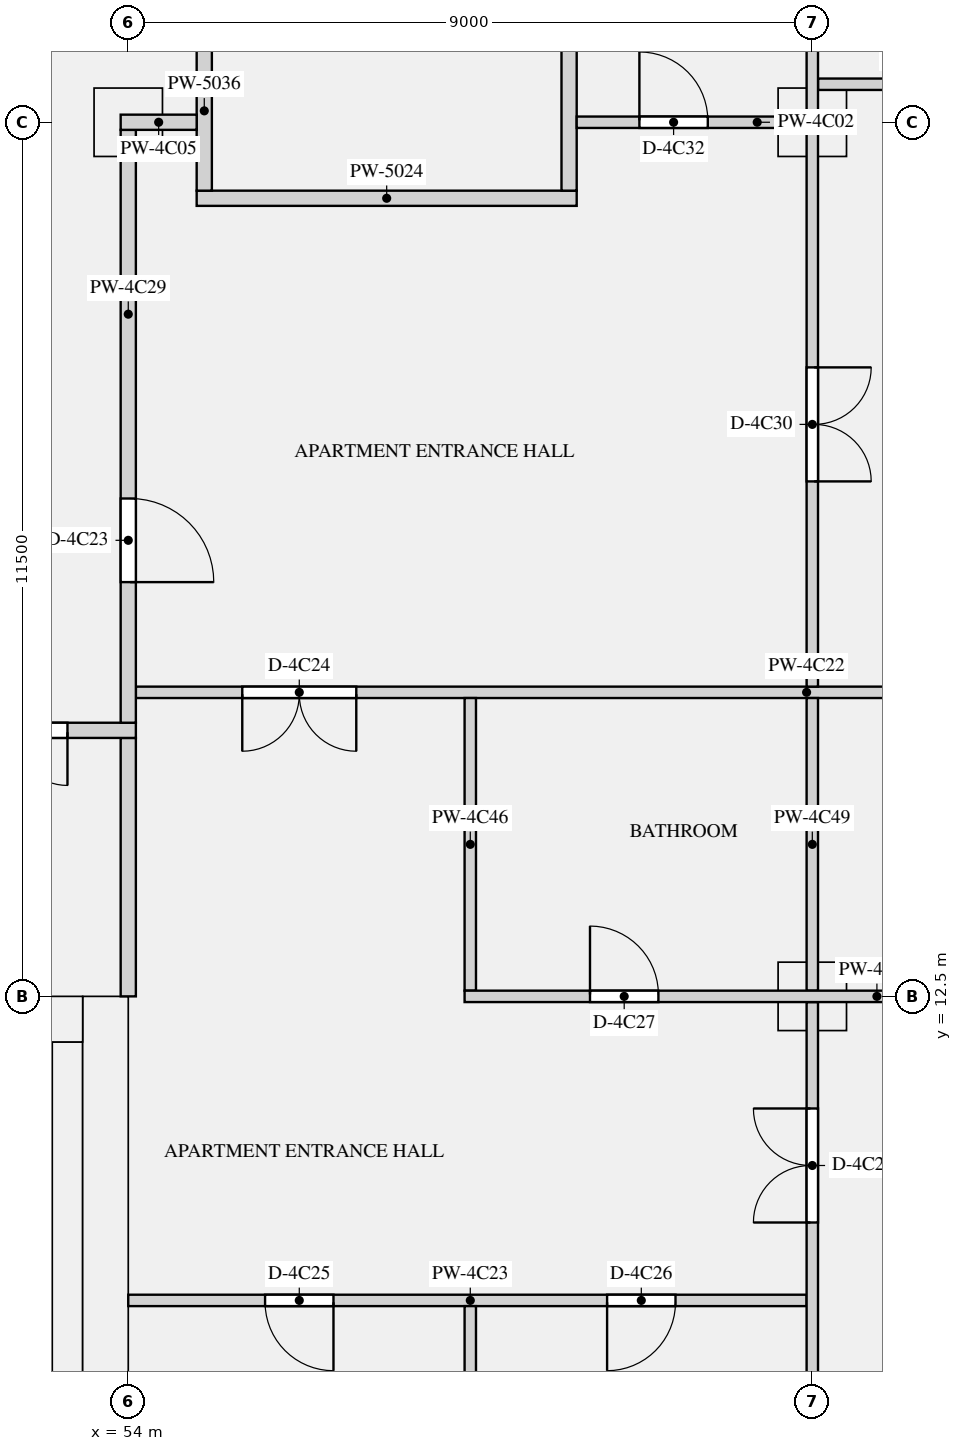
"""IFC4 building model, lengths in metres.
Left out: names, types, materials, properties, quantities, classifications, styles, units other than length and angle.
Written with IfcOpenShell. Run it as: python <this file> out.ifc"""

import sys

from ifc_helpers import new_model, si_unit, direction, frame, frame_2d, origin, origin_2d, place, context, subcontext, project, spatial, rectangle, extrude, element, fill, save


model = new_model("IFC4")
c1 = context("Model", 3, precision=1e-05, world=origin(), true_north=direction((0.0, 1.0)))
c2 = subcontext(c1, "Body", "Model", "MODEL_VIEW")
j1 = project(units=[si_unit("LENGTHUNIT", "METRE"), si_unit("PLANEANGLEUNIT", "RADIAN")], contexts=[c1])
p1 = place(None, origin())
s1 = spatial("IfcSite", under=j1, at=p1, CompositionType="ELEMENT")
p2 = place(p1, origin())
s2 = spatial("IfcBuilding", under=s1, at=p2, CompositionType="ELEMENT")
p3 = place(p2, frame((0.0, 0.0, 216.9)))
s3 = spatial("IfcBuildingStorey", under=s2, at=p3, CompositionType="ELEMENT", Elevation=216.9)
for number, where, z_axis, x_axis in (
    (1, (54.0, 24.0, 0.0), (0.0, 0.0, 1.0), (1.0, 0.0, 0.0)),
    (2, (63.0, 24.0, 0.0), (0.0, 0.0, 1.0), (1.0, 0.0, 0.0)),
    (3, (63.0, 12.5, 0.0), (0.0, 0.0, 1.0), (1.0, 0.0, 0.0)),
):
    element("IfcColumn", number, at=place(p3, frame(where, z_axis=z_axis, x_axis=x_axis)), inside=s3, PredefinedType="COLUMN", context=c2, shape_type="SweptSolid", body=[
        extrude(rectangle(XDim=0.9, YDim=0.9, at=origin_2d()), origin(), (0.0, 0.0, 1.0), 3.15),
    ])
p4 = place(p3, frame((53.7, 0.0, 0.0), z_axis=(0.0, 0.0, 1.0), x_axis=(0.0, 1.0, 0.0)))
e4 = element("IfcWall", 4, at=p4, inside=s3, PredefinedType="SHEAR", context=c2, shape_type="SweptSolid", body=[
    extrude(rectangle(XDim=12.5, YDim=0.6, at=frame_2d((6.25, 0.0))), origin(), (0.0, 0.0, 1.0), 3.15),
])
p5 = place(p3, frame((18.6, 12.2, 0.0), z_axis=(0.0, 0.0, 1.0), x_axis=(1.0, 0.0, 0.0)))
e5 = element("IfcWall", 5, at=p5, inside=s3, PredefinedType="SHEAR", context=c2, shape_type="SweptSolid", body=[
    extrude(rectangle(XDim=34.8, YDim=0.6, at=frame_2d((17.4, 0.0))), origin(), (0.0, 0.0, 1.0), 3.15),
])
p6 = place(p5, frame((24.575, 0.0, 0.0)))
e6 = element("IfcOpeningElement", 6, at=p6, cuts=e5, PredefinedType="OPENING", context=c2, shape_type="SweptSolid", body=[
    extrude(rectangle(XDim=1.1, YDim=2.1, at=frame_2d((0.55, 1.05))), frame((0.0, 0.31, 0.0), z_axis=(0.0, -1.0, 0.0), x_axis=(1.0, 0.0, 0.0)), (0.0, 0.0, 1.0), 0.62),
])
p7 = place(p5, frame((26.825, 0.0, 0.0)))
e7 = element("IfcOpeningElement", 7, at=p7, cuts=e5, PredefinedType="OPENING", context=c2, shape_type="SweptSolid", body=[
    extrude(rectangle(XDim=1.1, YDim=2.1, at=frame_2d((0.55, 1.05))), frame((0.0, 0.31, 0.0), z_axis=(0.0, -1.0, 0.0), x_axis=(1.0, 0.0, 0.0)), (0.0, 0.0, 1.0), 0.62),
])
p8 = place(p5, frame((29.075, 0.0, 0.0)))
e8 = element("IfcOpeningElement", 8, at=p8, cuts=e5, PredefinedType="OPENING", context=c2, shape_type="SweptSolid", body=[
    extrude(rectangle(XDim=1.1, YDim=2.1, at=frame_2d((0.55, 1.05))), frame((0.0, 0.31, 0.0), z_axis=(0.0, -1.0, 0.0), x_axis=(1.0, 0.0, 0.0)), (0.0, 0.0, 1.0), 0.62),
])
p9 = place(p5, frame((8.95, 0.0, 0.0)))
e9 = element("IfcOpeningElement", 9, at=p9, cuts=e5, PredefinedType="OPENING", context=c2, shape_type="SweptSolid", body=[
    extrude(rectangle(XDim=0.9, YDim=2.1, at=frame_2d((0.45, 1.05))), frame((0.0, 0.31, 0.0), z_axis=(0.0, -1.0, 0.0), x_axis=(1.0, 0.0, 0.0)), (0.0, 0.0, 1.0), 0.62),
])
p10 = place(p5, frame((1.55, 0.0, 0.0)))
e10 = element("IfcOpeningElement", 10, at=p10, cuts=e5, PredefinedType="OPENING", context=c2, shape_type="SweptSolid", body=[
    extrude(rectangle(XDim=1.2, YDim=2.1, at=frame_2d((0.6, 1.05))), frame((0.0, 0.31, 0.0), z_axis=(0.0, -1.0, 0.0), x_axis=(1.0, 0.0, 0.0)), (0.0, 0.0, 1.0), 0.62),
])
p11 = place(p5, frame((32.05, 0.0, 0.0)))
e11 = element("IfcOpeningElement", 11, at=p11, cuts=e5, PredefinedType="OPENING", context=c2, shape_type="SweptSolid", body=[
    extrude(rectangle(XDim=1.2, YDim=2.1, at=frame_2d((0.6, 1.05))), frame((0.0, 0.31, 0.0), z_axis=(0.0, -1.0, 0.0), x_axis=(1.0, 0.0, 0.0)), (0.0, 0.0, 1.0), 0.62),
])
p12 = place(p3, frame((53.2, 1.0, 0.0), z_axis=(0.0, 0.0, 1.0), x_axis=(0.0, 1.0, 0.0)))
e12 = element("IfcWall", 12, at=p12, inside=s3, PredefinedType="SHEAR", context=c2, shape_type="SweptSolid", body=[
    extrude(rectangle(XDim=10.9, YDim=0.4, at=frame_2d((5.45, 0.0))), origin(), (0.0, 0.0, 1.0), 3.15),
])
p13 = place(p3, frame((54.9, 23.0, 0.0), z_axis=(0.0, 0.0, 1.0), x_axis=(1.0, 0.0, 0.0)))
e13 = element("IfcWall", 13, at=p13, inside=s3, PredefinedType="PARTITIONING", context=c2, shape_type="SweptSolid", body=[
    extrude(rectangle(XDim=5.0, YDim=0.2, at=frame_2d((2.5, 0.0))), origin(), (0.0, 0.0, 1.0), 2.83),
])
p14 = place(p3, frame((54.0, 12.5, 0.0), z_axis=(0.0, 0.0, 1.0), x_axis=(0.0, 1.0, 0.0)))
e14 = element("IfcWall", 14, at=p14, inside=s3, PredefinedType="PARTITIONING", context=c2, shape_type="SweptSolid", body=[
    extrude(rectangle(XDim=3.4, YDim=0.2, at=frame_2d((1.7, 0.0))), origin(), (0.0, 0.0, 1.0), 2.83),
])
p15 = place(p3, frame((55.0, 23.1, 0.0), z_axis=(0.0, 0.0, 1.0), x_axis=(0.0, 1.0, 0.0)))
e15 = element("IfcWall", 15, at=p15, inside=s3, PredefinedType="PARTITIONING", context=c2, shape_type="SweptSolid", body=[
    extrude(rectangle(XDim=3.8, YDim=0.2, at=frame_2d((1.9, 0.0))), origin(), (0.0, 0.0, 1.0), 2.83),
])
p16 = place(p15, frame((2.1, 0.0, 0.0)))
e16 = element("IfcOpeningElement", 16, at=p16, cuts=e15, PredefinedType="OPENING", context=c2, shape_type="SweptSolid", body=[
    extrude(rectangle(XDim=1.2, YDim=2.1, at=frame_2d((0.6, 1.05))), frame((0.0, 0.11, 0.0), z_axis=(0.0, -1.0, 0.0), x_axis=(1.0, 0.0, 0.0)), (0.0, 0.0, 1.0), 0.22),
])
p17 = place(p3, frame((59.8, 23.1, 0.0), z_axis=(0.0, 0.0, 1.0), x_axis=(0.0, 1.0, 0.0)))
e17 = element("IfcWall", 17, at=p17, inside=s3, PredefinedType="PARTITIONING", context=c2, shape_type="SweptSolid", body=[
    extrude(rectangle(XDim=3.9, YDim=0.2, at=frame_2d((1.95, 0.0))), origin(), (0.0, 0.0, 1.0), 2.83),
])
p18 = place(p3, frame((59.9, 24.0, 0.0), z_axis=(0.0, 0.0, 1.0), x_axis=(1.0, 0.0, 0.0)))
e18 = element("IfcWall", 18, at=p18, inside=s3, PredefinedType="PARTITIONING", context=c2, shape_type="SweptSolid", body=[
    extrude(rectangle(XDim=3.025, YDim=0.15, at=frame_2d((1.513, 0.0))), origin(), (0.0, 0.0, 1.0), 2.83),
])
p19 = place(p18, frame((0.825, 0.0, 0.0)))
e19 = element("IfcOpeningElement", 19, at=p19, cuts=e18, PredefinedType="OPENING", context=c2, shape_type="SweptSolid", body=[
    extrude(rectangle(XDim=0.9, YDim=2.1, at=frame_2d((0.45, 1.05))), frame((0.0, 0.085, 0.0), z_axis=(0.0, -1.0, 0.0), x_axis=(1.0, 0.0, 0.0)), (0.0, 0.0, 1.0), 0.17),
])
p20 = place(p3, frame((53.9, 24.0, 0.0), z_axis=(0.0, 0.0, 1.0), x_axis=(1.0, 0.0, 0.0)))
e20 = element("IfcWall", 20, at=p20, inside=s3, PredefinedType="PARTITIONING", context=c2, shape_type="SweptSolid", body=[
    extrude(rectangle(XDim=1.0, YDim=0.2, at=frame_2d((0.5, 0.0))), origin(), (0.0, 0.0, 1.0), 2.83),
])
p21 = place(p3, frame((58.425, 12.5, 0.0), z_axis=(0.0, 0.0, 1.0), x_axis=(1.0, 0.0, 0.0)))
e21 = element("IfcWall", 21, at=p21, inside=s3, PredefinedType="PARTITIONING", context=c2, shape_type="SweptSolid", body=[
    extrude(rectangle(XDim=12.925, YDim=0.15, at=frame_2d((6.462, 0.0))), origin(), (0.0, 0.0, 1.0), 2.83),
])
p22 = place(p21, frame((1.65, 0.0, 0.0)))
e22 = element("IfcOpeningElement", 22, at=p22, cuts=e21, PredefinedType="OPENING", context=c2, shape_type="SweptSolid", body=[
    extrude(rectangle(XDim=0.9, YDim=2.1, at=frame_2d((0.45, 1.05))), frame((0.0, 0.085, 0.0), z_axis=(0.0, -1.0, 0.0), x_axis=(1.0, 0.0, 0.0)), (0.0, 0.0, 1.0), 0.17),
])
p23 = place(p21, frame((8.3, 0.0, 0.0)))
e23 = element("IfcOpeningElement", 23, at=p23, cuts=e21, PredefinedType="OPENING", context=c2, shape_type="SweptSolid", body=[
    extrude(rectangle(XDim=1.5, YDim=2.1, at=frame_2d((0.75, 1.05))), frame((0.0, 0.085, 0.0), z_axis=(0.0, -1.0, 0.0), x_axis=(1.0, 0.0, 0.0)), (0.0, 0.0, 1.0), 0.17),
])
p24 = place(p3, frame((54.1, 16.5, 0.0), z_axis=(0.0, 0.0, 1.0), x_axis=(1.0, 0.0, 0.0)))
e24 = element("IfcWall", 24, at=p24, inside=s3, PredefinedType="PARTITIONING", context=c2, shape_type="SweptSolid", body=[
    extrude(rectangle(XDim=14.75, YDim=0.15, at=frame_2d((7.375, 0.0))), origin(), (0.0, 0.0, 1.0), 2.83),
])
p25 = place(p24, frame((1.4, 0.0, 0.0)))
e25 = element("IfcOpeningElement", 25, at=p25, cuts=e24, PredefinedType="OPENING", context=c2, shape_type="SweptSolid", body=[
    extrude(rectangle(XDim=1.5, YDim=2.1, at=frame_2d((0.75, 1.05))), frame((0.0, 0.085, 0.0), z_axis=(0.0, -1.0, 0.0), x_axis=(1.0, 0.0, 0.0)), (0.0, 0.0, 1.0), 0.17),
])
p26 = place(p3, frame((54.0, 8.5, 0.0), z_axis=(0.0, 0.0, 1.0), x_axis=(1.0, 0.0, 0.0)))
e26 = element("IfcWall", 26, at=p26, inside=s3, PredefinedType="PARTITIONING", context=c2, shape_type="SweptSolid", body=[
    extrude(rectangle(XDim=8.925, YDim=0.15, at=frame_2d((4.462, 0.0))), origin(), (0.0, 0.0, 1.0), 2.83),
])
p27 = place(p26, frame((1.8, 0.0, 0.0)))
e27 = element("IfcOpeningElement", 27, at=p27, cuts=e26, PredefinedType="OPENING", context=c2, shape_type="SweptSolid", body=[
    extrude(rectangle(XDim=0.9, YDim=2.1, at=frame_2d((0.45, 1.05))), frame((0.0, 0.085, 0.0), z_axis=(0.0, -1.0, 0.0), x_axis=(1.0, 0.0, 0.0)), (0.0, 0.0, 1.0), 0.17),
])
p28 = place(p26, frame((6.3, 0.0, 0.0)))
e28 = element("IfcOpeningElement", 28, at=p28, cuts=e26, PredefinedType="OPENING", context=c2, shape_type="SweptSolid", body=[
    extrude(rectangle(XDim=0.9, YDim=2.1, at=frame_2d((0.45, 1.05))), frame((0.0, 0.085, 0.0), z_axis=(0.0, -1.0, 0.0), x_axis=(1.0, 0.0, 0.0)), (0.0, 0.0, 1.0), 0.17),
])
p29 = place(p3, frame((63.075, 24.5, 0.0), z_axis=(0.0, 0.0, 1.0), x_axis=(1.0, 0.0, 0.0)))
e29 = element("IfcWall", 29, at=p29, inside=s3, PredefinedType="PARTITIONING", context=c2, shape_type="SweptSolid", body=[
    extrude(rectangle(XDim=5.775, YDim=0.15, at=frame_2d((2.888, 0.0))), origin(), (0.0, 0.0, 1.0), 2.83),
])
p30 = place(p29, frame((2.7, 0.0, 0.0)))
e30 = element("IfcOpeningElement", 30, at=p30, cuts=e29, PredefinedType="OPENING", context=c2, shape_type="SweptSolid", body=[
    extrude(rectangle(XDim=0.9, YDim=2.1, at=frame_2d((0.45, 1.05))), frame((0.0, 0.085, 0.0), z_axis=(0.0, -1.0, 0.0), x_axis=(1.0, 0.0, 0.0)), (0.0, 0.0, 1.0), 0.17),
])
p31 = place(p3, frame((17.925, 16.0, 0.0), z_axis=(0.0, 0.0, 1.0), x_axis=(1.0, 0.0, 0.0)))
e31 = element("IfcWall", 31, at=p31, inside=s3, PredefinedType="PARTITIONING", context=c2, shape_type="SweptSolid", body=[
    extrude(rectangle(XDim=36.175, YDim=0.2, at=frame_2d((18.087, 0.0))), origin(), (0.0, 0.0, 1.0), 2.83),
])
p32 = place(p31, frame((0.875, 0.0, 0.0)))
e32 = element("IfcOpeningElement", 32, at=p32, cuts=e31, PredefinedType="OPENING", context=c2, shape_type="SweptSolid", body=[
    extrude(rectangle(XDim=1.4, YDim=2.1, at=frame_2d((0.7, 1.05))), frame((0.0, 0.11, 0.0), z_axis=(0.0, -1.0, 0.0), x_axis=(1.0, 0.0, 0.0)), (0.0, 0.0, 1.0), 0.22),
])
p33 = place(p31, frame((33.875, 0.0, 0.0)))
e33 = element("IfcOpeningElement", 33, at=p33, cuts=e31, PredefinedType="OPENING", context=c2, shape_type="SweptSolid", body=[
    extrude(rectangle(XDim=1.4, YDim=2.1, at=frame_2d((0.7, 1.05))), frame((0.0, 0.11, 0.0), z_axis=(0.0, -1.0, 0.0), x_axis=(1.0, 0.0, 0.0)), (0.0, 0.0, 1.0), 0.22),
])
p34 = place(p3, frame((54.0, 16.1, 0.0), z_axis=(0.0, 0.0, 1.0), x_axis=(0.0, 1.0, 0.0)))
e34 = element("IfcWall", 34, at=p34, inside=s3, PredefinedType="PARTITIONING", context=c2, shape_type="SweptSolid", body=[
    extrude(rectangle(XDim=7.8, YDim=0.2, at=frame_2d((3.9, 0.0))), origin(), (0.0, 0.0, 1.0), 2.83),
])
p35 = place(p34, frame((1.85, 0.0, 0.0)))
e35 = element("IfcOpeningElement", 35, at=p35, cuts=e34, PredefinedType="OPENING", context=c2, shape_type="SweptSolid", body=[
    extrude(rectangle(XDim=1.1, YDim=2.1, at=frame_2d((0.55, 1.05))), frame((0.0, 0.11, 0.0), z_axis=(0.0, -1.0, 0.0), x_axis=(1.0, 0.0, 0.0)), (0.0, 0.0, 1.0), 0.22),
])
p36 = place(p3, frame((58.5, 0.65, 0.0), z_axis=(0.0, 0.0, 1.0), x_axis=(0.0, 1.0, 0.0)))
e36 = element("IfcWall", 36, at=p36, inside=s3, PredefinedType="PARTITIONING", context=c2, shape_type="SweptSolid", body=[
    extrude(rectangle(XDim=7.775, YDim=0.15, at=frame_2d((3.888, 0.0))), origin(), (0.0, 0.0, 1.0), 2.83),
])
p37 = place(p3, frame((58.5, 12.575, 0.0), z_axis=(0.0, 0.0, 1.0), x_axis=(0.0, 1.0, 0.0)))
e37 = element("IfcWall", 37, at=p37, inside=s3, PredefinedType="PARTITIONING", context=c2, shape_type="SweptSolid", body=[
    extrude(rectangle(XDim=3.85, YDim=0.15, at=frame_2d((1.925, 0.0))), origin(), (0.0, 0.0, 1.0), 2.83),
])
p38 = place(p3, frame((63.0, 0.65, 0.0), z_axis=(0.0, 0.0, 1.0), x_axis=(0.0, 1.0, 0.0)))
e38 = element("IfcWall", 38, at=p38, inside=s3, PredefinedType="PARTITIONING", context=c2, shape_type="SweptSolid", body=[
    extrude(rectangle(XDim=11.775, YDim=0.15, at=frame_2d((5.888, 0.0))), origin(), (0.0, 0.0, 1.0), 2.83),
])
p39 = place(p38, frame((8.875, 0.0, 0.0)))
e39 = element("IfcOpeningElement", 39, at=p39, cuts=e38, PredefinedType="OPENING", context=c2, shape_type="SweptSolid", body=[
    extrude(rectangle(XDim=1.5, YDim=2.1, at=frame_2d((0.75, 1.05))), frame((0.0, 0.085, 0.0), z_axis=(0.0, -1.0, 0.0), x_axis=(1.0, 0.0, 0.0)), (0.0, 0.0, 1.0), 0.17),
])
p40 = place(p3, frame((63.0, 12.575, 0.0), z_axis=(0.0, 0.0, 1.0), x_axis=(0.0, 1.0, 0.0)))
e40 = element("IfcWall", 40, at=p40, inside=s3, PredefinedType="PARTITIONING", context=c2, shape_type="SweptSolid", body=[
    extrude(rectangle(XDim=3.85, YDim=0.15, at=frame_2d((1.925, 0.0))), origin(), (0.0, 0.0, 1.0), 2.83),
])
p41 = place(p3, frame((63.0, 16.575, 0.0), z_axis=(0.0, 0.0, 1.0), x_axis=(0.0, 1.0, 0.0)))
e41 = element("IfcWall", 41, at=p41, inside=s3, PredefinedType="PARTITIONING", context=c2, shape_type="SweptSolid", body=[
    extrude(rectangle(XDim=24.275, YDim=0.15, at=frame_2d((12.138, 0.0))), origin(), (0.0, 0.0, 1.0), 2.83),
])
p42 = place(p41, frame((2.7, 0.0, 0.0)))
e42 = element("IfcOpeningElement", 42, at=p42, cuts=e41, PredefinedType="OPENING", context=c2, shape_type="SweptSolid", body=[
    extrude(rectangle(XDim=1.5, YDim=2.1, at=frame_2d((0.75, 1.05))), frame((0.0, 0.085, 0.0), z_axis=(0.0, -1.0, 0.0), x_axis=(1.0, 0.0, 0.0)), (0.0, 0.0, 1.0), 0.17),
])
p43 = place(p41, frame((13.6, 0.0, 0.0)))
e43 = element("IfcOpeningElement", 43, at=p43, cuts=e41, PredefinedType="OPENING", context=c2, shape_type="SweptSolid", body=[
    extrude(rectangle(XDim=0.9, YDim=2.1, at=frame_2d((0.45, 1.05))), frame((0.0, 0.085, 0.0), z_axis=(0.0, -1.0, 0.0), x_axis=(1.0, 0.0, 0.0)), (0.0, 0.0, 1.0), 0.17),
])
p44 = place(p41, frame((16.875, 0.0, 0.0)))
e44 = element("IfcOpeningElement", 44, at=p44, cuts=e41, PredefinedType="OPENING", context=c2, shape_type="SweptSolid", body=[
    extrude(rectangle(XDim=0.9, YDim=2.1, at=frame_2d((0.45, 1.05))), frame((0.0, 0.085, 0.0), z_axis=(0.0, -1.0, 0.0), x_axis=(1.0, 0.0, 0.0)), (0.0, 0.0, 1.0), 0.17),
])
p45 = place(p33, frame((1.4, 0.0, 0.0), z_axis=(0.0, 0.0, 1.0), x_axis=(-1.0, 0.0, 0.0)))
e45 = element("IfcDoor", 45, at=p45, inside=s3, OperationType="DOUBLE_DOOR_SINGLE_SWING", PredefinedType="DOOR", context=c2, shape_type="SweptSolid", body=[
    extrude(rectangle(XDim=1.4, YDim=2.1, at=frame_2d((0.7, 1.05))), frame((0.0, 0.025, 0.0), z_axis=(0.0, -1.0, 0.0), x_axis=(1.0, 0.0, 0.0)), (0.0, 0.0, 1.0), 0.05),
])
fill(e33, e45)
p46 = place(p35, frame((1.1, 0.0, 0.0), z_axis=(0.0, 0.0, 1.0), x_axis=(-1.0, 0.0, 0.0)))
e46 = element("IfcDoor", 46, at=p46, inside=s3, OperationType="SINGLE_SWING_RIGHT", PredefinedType="DOOR", context=c2, shape_type="SweptSolid", body=[
    extrude(rectangle(XDim=1.1, YDim=2.1, at=frame_2d((0.55, 1.05))), frame((0.0, 0.025, 0.0), z_axis=(0.0, -1.0, 0.0), x_axis=(1.0, 0.0, 0.0)), (0.0, 0.0, 1.0), 0.05),
])
fill(e35, e46)
p47 = place(p25, frame((1.5, 0.0, 0.0), z_axis=(0.0, 0.0, 1.0), x_axis=(-1.0, 0.0, 0.0)))
e47 = element("IfcDoor", 47, at=p47, inside=s3, OperationType="DOUBLE_DOOR_SINGLE_SWING", PredefinedType="DOOR", context=c2, shape_type="SweptSolid", body=[
    extrude(rectangle(XDim=1.5, YDim=2.1, at=frame_2d((0.75, 1.05))), frame((0.0, 0.025, 0.0), z_axis=(0.0, -1.0, 0.0), x_axis=(1.0, 0.0, 0.0)), (0.0, 0.0, 1.0), 0.05),
])
fill(e25, e47)
p48 = place(p27, frame((0.9, 0.0, 0.0), z_axis=(0.0, 0.0, 1.0), x_axis=(-1.0, 0.0, 0.0)))
e48 = element("IfcDoor", 48, at=p48, inside=s3, OperationType="SINGLE_SWING_LEFT", PredefinedType="DOOR", context=c2, shape_type="SweptSolid", body=[
    extrude(rectangle(XDim=0.9, YDim=2.1, at=frame_2d((0.45, 1.05))), frame((0.0, 0.025, 0.0), z_axis=(0.0, -1.0, 0.0), x_axis=(1.0, 0.0, 0.0)), (0.0, 0.0, 1.0), 0.05),
])
fill(e27, e48)
p49 = place(p28, frame((0.9, 0.0, 0.0), z_axis=(0.0, 0.0, 1.0), x_axis=(-1.0, 0.0, 0.0)))
e49 = element("IfcDoor", 49, at=p49, inside=s3, OperationType="SINGLE_SWING_RIGHT", PredefinedType="DOOR", context=c2, shape_type="SweptSolid", body=[
    extrude(rectangle(XDim=0.9, YDim=2.1, at=frame_2d((0.45, 1.05))), frame((0.0, 0.025, 0.0), z_axis=(0.0, -1.0, 0.0), x_axis=(1.0, 0.0, 0.0)), (0.0, 0.0, 1.0), 0.05),
])
fill(e28, e49)
p50 = place(p22, origin())
e50 = element("IfcDoor", 50, at=p50, inside=s3, OperationType="SINGLE_SWING_LEFT", PredefinedType="DOOR", context=c2, shape_type="SweptSolid", body=[
    extrude(rectangle(XDim=0.9, YDim=2.1, at=frame_2d((0.45, 1.05))), frame((0.0, 0.025, 0.0), z_axis=(0.0, -1.0, 0.0), x_axis=(1.0, 0.0, 0.0)), (0.0, 0.0, 1.0), 0.05),
])
fill(e22, e50)
p51 = place(p39, origin())
e51 = element("IfcDoor", 51, at=p51, inside=s3, OperationType="DOUBLE_DOOR_SINGLE_SWING", PredefinedType="DOOR", context=c2, shape_type="SweptSolid", body=[
    extrude(rectangle(XDim=1.5, YDim=2.1, at=frame_2d((0.75, 1.05))), frame((0.0, 0.025, 0.0), z_axis=(0.0, -1.0, 0.0), x_axis=(1.0, 0.0, 0.0)), (0.0, 0.0, 1.0), 0.05),
])
fill(e39, e51)
p52 = place(p42, frame((1.5, 0.0, 0.0), z_axis=(0.0, 0.0, 1.0), x_axis=(-1.0, 0.0, 0.0)))
e52 = element("IfcDoor", 52, at=p52, inside=s3, OperationType="DOUBLE_DOOR_SINGLE_SWING", PredefinedType="DOOR", context=c2, shape_type="SweptSolid", body=[
    extrude(rectangle(XDim=1.5, YDim=2.1, at=frame_2d((0.75, 1.05))), frame((0.0, 0.025, 0.0), z_axis=(0.0, -1.0, 0.0), x_axis=(1.0, 0.0, 0.0)), (0.0, 0.0, 1.0), 0.05),
])
fill(e42, e52)
p53 = place(p19, origin())
e53 = element("IfcDoor", 53, at=p53, inside=s3, OperationType="SINGLE_SWING_LEFT", PredefinedType="DOOR", context=c2, shape_type="SweptSolid", body=[
    extrude(rectangle(XDim=0.9, YDim=2.1, at=frame_2d((0.45, 1.05))), frame((0.0, 0.025, 0.0), z_axis=(0.0, -1.0, 0.0), x_axis=(1.0, 0.0, 0.0)), (0.0, 0.0, 1.0), 0.05),
])
fill(e19, e53)
save(model, sys.argv[1])
